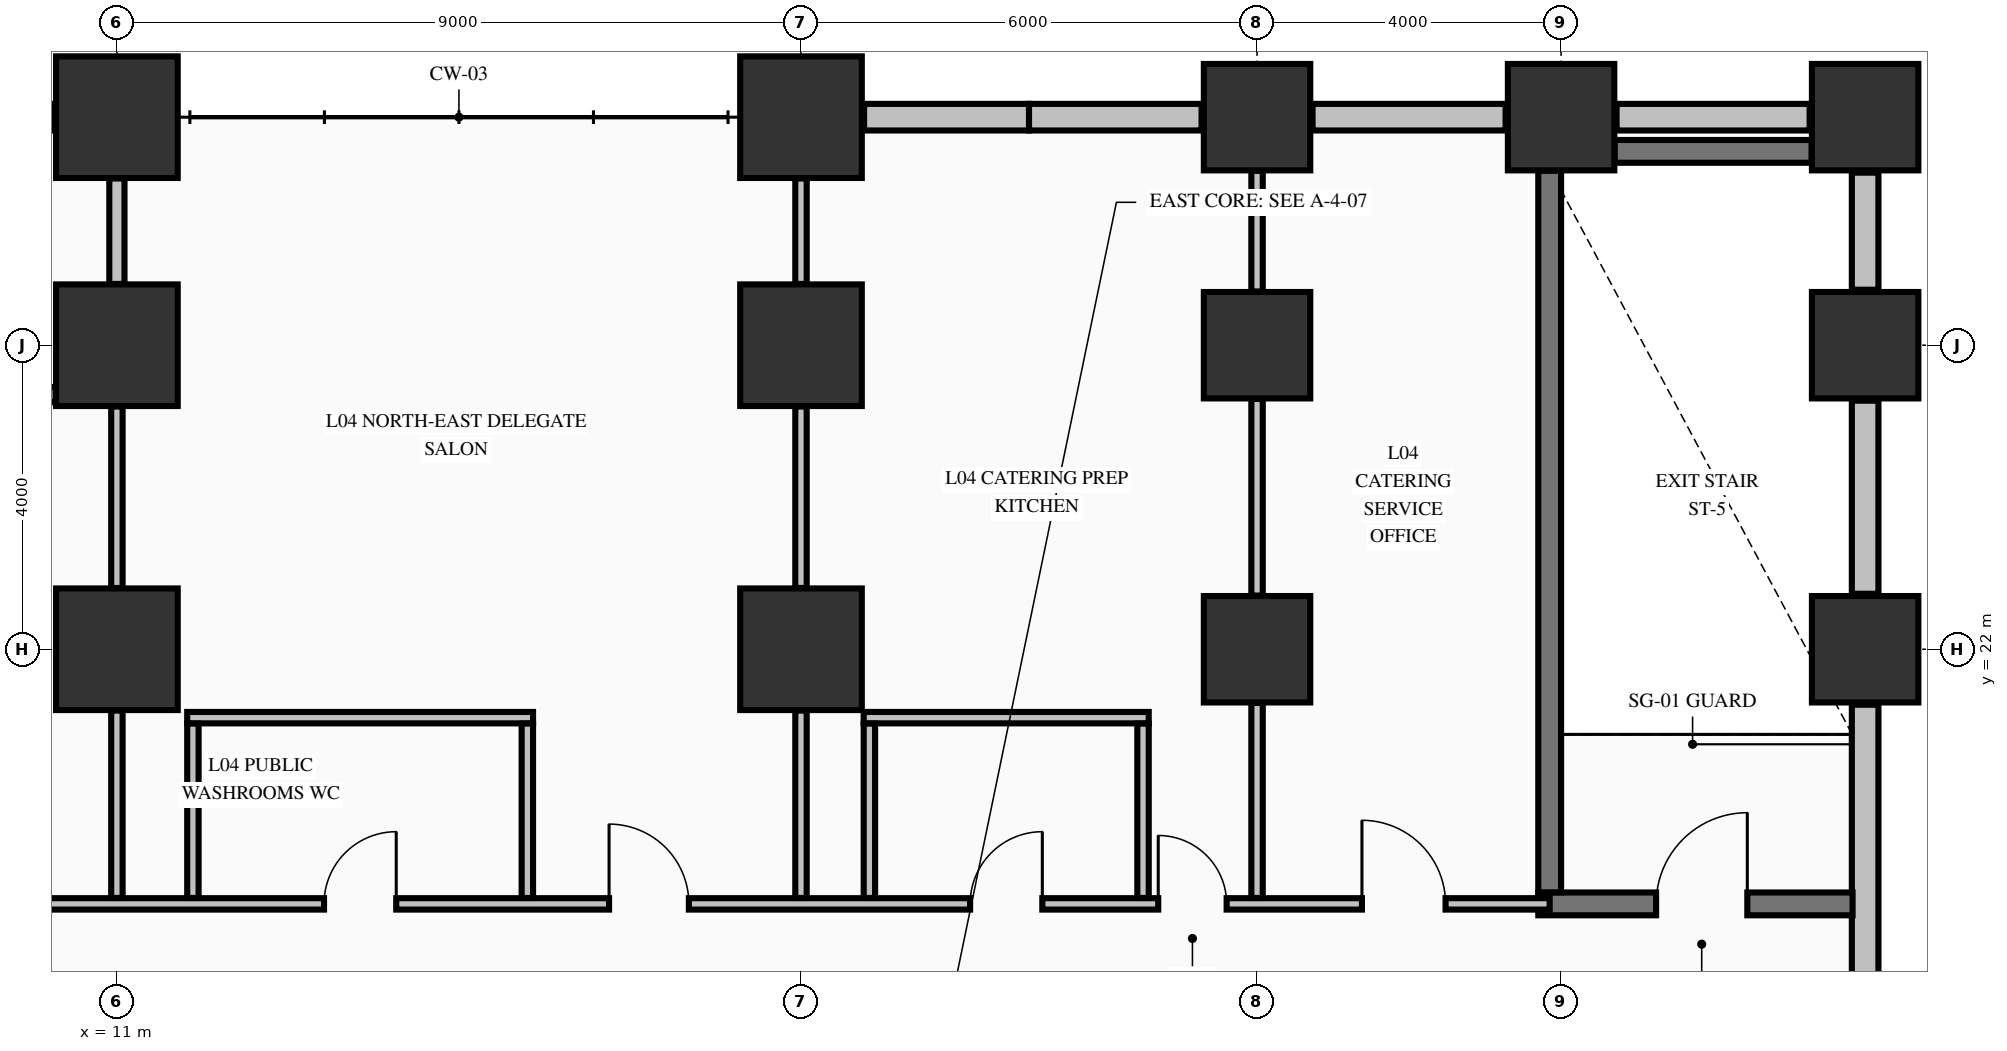
"""IFC4 building model, lengths in metres.
Left out: names, types, materials, properties, quantities, classifications, styles, units other than length and angle.
Written with IfcOpenShell. Run it as: python <this file> out.ifc"""

import sys

from ifc_helpers import new_model, si_unit, direction, frame, frame_2d, origin, origin_2d, place, context, subcontext, project, spatial, rectangle, extrude, element, fill, save


model = new_model("IFC4")
c1 = context("Model", 3, precision=1e-05, world=origin(), true_north=direction((0.0, 1.0)))
c2 = subcontext(c1, "Body", "Model", "MODEL_VIEW")
j1 = project(units=[si_unit("LENGTHUNIT", "METRE"), si_unit("PLANEANGLEUNIT", "RADIAN")], contexts=[c1])
p1 = place(None, origin())
s1 = spatial("IfcSite", under=j1, at=p1, CompositionType="ELEMENT")
p2 = place(p1, origin())
s2 = spatial("IfcBuilding", under=s1, at=p2, CompositionType="ELEMENT")
p3 = place(p2, frame((0.0, 0.0, 21.76)))
s3 = spatial("IfcBuildingStorey", under=s2, at=p3, CompositionType="ELEMENT", Elevation=21.76)
for number, where, z_axis, x_axis in (
    (1, (11.0, 22.0, -0.45), (0.0, 0.0, 1.0), (1.0, 0.0, 0.0)),
    (2, (11.0, 26.0, -0.45), (0.0, 0.0, 1.0), (1.0, 0.0, 0.0)),
    (3, (11.0, 29.0, -0.45), (0.0, 0.0, 1.0), (1.0, 0.0, 0.0)),
    (4, (20.0, 22.0, -0.45), (0.0, 0.0, 1.0), (1.0, 0.0, 0.0)),
    (5, (20.0, 26.0, -0.45), (0.0, 0.0, 1.0), (1.0, 0.0, 0.0)),
    (6, (20.0, 29.0, -0.45), (0.0, 0.0, 1.0), (1.0, 0.0, 0.0)),
):
    element("IfcColumn", number, at=place(p3, frame(where, z_axis=z_axis, x_axis=x_axis)), inside=s3, PredefinedType="COLUMN", context=c2, shape_type="SweptSolid", body=[
        extrude(rectangle(XDim=1.6, YDim=1.6, at=origin_2d()), origin(), (0.0, 0.0, 1.0), 5.44),
    ])
for number, where, z_axis, x_axis in (
    (7, (26.0, 22.0, -0.45), (0.0, 0.0, 1.0), (1.0, 0.0, 0.0)),
    (8, (26.0, 26.0, -0.45), (0.0, 0.0, 1.0), (1.0, 0.0, 0.0)),
    (9, (26.0, 29.0, -0.45), (0.0, 0.0, 1.0), (1.0, 0.0, 0.0)),
    (10, (30.0, 29.0, -0.45), (0.0, 0.0, 1.0), (1.0, 0.0, 0.0)),
    (11, (34.0, 22.0, -0.45), (0.0, 0.0, 1.0), (1.0, 0.0, 0.0)),
    (12, (34.0, 26.0, -0.45), (0.0, 0.0, 1.0), (1.0, 0.0, 0.0)),
    (13, (34.0, 29.0, -0.45), (0.0, 0.0, 1.0), (1.0, 0.0, 0.0)),
):
    element("IfcColumn", number, at=place(p3, frame(where, z_axis=z_axis, x_axis=x_axis)), inside=s3, PredefinedType="COLUMN", context=c2, shape_type="SweptSolid", body=[
        extrude(rectangle(XDim=1.4, YDim=1.4, at=origin_2d()), origin(), (0.0, 0.0, 1.0), 5.44),
    ])
p4 = place(p3, frame((10.17, 29.0, 0.0), z_axis=(0.0, 0.0, 1.0), x_axis=(-1.0, 0.0, 0.0)))
e14 = element("IfcWall", 14, at=p4, inside=s3, PredefinedType="STANDARD", context=c2, shape_type="SweptSolid", body=[
    extrude(rectangle(XDim=20.34, YDim=0.35, at=frame_2d((10.17, 0.0))), origin(), (0.0, 0.0, 1.0), 2.582),
])
p5 = place(p3, frame((23.0, 29.0, 0.0), z_axis=(0.0, 0.0, 1.0), x_axis=(-1.0, 0.0, 0.0)))
e15 = element("IfcWall", 15, at=p5, inside=s3, PredefinedType="STANDARD", context=c2, shape_type="SweptSolid", body=[
    extrude(rectangle(XDim=2.17, YDim=0.35, at=frame_2d((1.085, 0.0))), origin(), (0.0, 0.0, 1.0), 3.332),
])
p6 = place(p3, frame((25.27, 29.0, 0.0), z_axis=(0.0, 0.0, 1.0), x_axis=(-1.0, 0.0, 0.0)))
e16 = element("IfcWall", 16, at=p6, inside=s3, PredefinedType="STANDARD", context=c2, shape_type="SweptSolid", body=[
    extrude(rectangle(XDim=2.27, YDim=0.35, at=frame_2d((1.135, 0.0))), origin(), (0.0, 0.0, 1.0), 3.332),
])
for number, where, z_axis, x_axis in (
    (17, (29.27, 29.0, 0.0), (0.0, 0.0, 1.0), (-1.0, 0.0, 0.0)),
    (18, (33.27, 29.0, 0.0), (0.0, 0.0, 1.0), (-1.0, 0.0, 0.0)),
):
    element("IfcWall", number, at=place(p3, frame(where, z_axis=z_axis, x_axis=x_axis)), inside=s3, PredefinedType="STANDARD", context=c2, shape_type="SweptSolid", body=[
        extrude(rectangle(XDim=2.54, YDim=0.35, at=frame_2d((1.27, 0.0))), origin(), (0.0, 0.0, 1.0), 3.332),
    ])
p7 = place(p3, frame((34.0, 21.27, 0.0), z_axis=(0.0, 0.0, 1.0), x_axis=(0.0, -1.0, 0.0)))
e19 = element("IfcWall", 19, at=p7, inside=s3, PredefinedType="STANDARD", context=c2, shape_type="SweptSolid", body=[
    extrude(rectangle(XDim=4.54, YDim=0.35, at=frame_2d((2.27, 0.0))), origin(), (0.0, 0.0, 1.0), 4.99),
])
p8 = place(p3, frame((34.0, 25.27, 0.0), z_axis=(0.0, 0.0, 1.0), x_axis=(0.0, -1.0, 0.0)))
e20 = element("IfcWall", 20, at=p8, inside=s3, PredefinedType="STANDARD", context=c2, shape_type="SweptSolid", body=[
    extrude(rectangle(XDim=2.54, YDim=0.35, at=frame_2d((1.27, 0.0))), origin(), (0.0, 0.0, 1.0), 4.99),
])
p9 = place(p3, frame((34.0, 28.27, 0.0), z_axis=(0.0, 0.0, 1.0), x_axis=(0.0, -1.0, 0.0)))
e21 = element("IfcWall", 21, at=p9, inside=s3, PredefinedType="STANDARD", context=c2, shape_type="SweptSolid", body=[
    extrude(rectangle(XDim=1.54, YDim=0.35, at=frame_2d((0.77, 0.0))), origin(), (0.0, 0.0, 1.0), 4.99),
])
p10 = place(p3, frame((29.7, 18.65, 0.0), z_axis=(0.0, 0.0, 1.0), x_axis=(1.0, 0.0, 0.0)))
e22 = element("IfcWall", 22, at=p10, inside=s3, PredefinedType="SHEAR", context=c2, shape_type="SweptSolid", body=[
    extrude(rectangle(XDim=4.135, YDim=0.3, at=frame_2d((2.067, 0.0))), origin(), (0.0, 0.0, 1.0), 4.99),
])
p11 = place(p10, frame((1.55, 0.0, 0.0)))
e23 = element("IfcOpeningElement", 23, at=p11, cuts=e22, PredefinedType="OPENING", context=c2, shape_type="SweptSolid", body=[
    extrude(rectangle(XDim=1.2, YDim=2.15, at=frame_2d((0.6, 1.075))), frame((0.0, 0.16, 0.0), z_axis=(0.0, -1.0, 0.0), x_axis=(1.0, 0.0, 0.0)), (0.0, 0.0, 1.0), 0.32),
])
p12 = place(p3, frame((30.704, 28.55, 0.0), z_axis=(0.0, 0.0, 1.0), x_axis=(1.0, 0.0, 0.0)))
e24 = element("IfcWall", 24, at=p12, inside=s3, PredefinedType="SHEAR", context=c2, shape_type="SweptSolid", body=[
    extrude(rectangle(XDim=2.592, YDim=0.3, at=frame_2d((1.296, 0.0))), origin(), (0.0, 0.0, 1.0), 4.99),
])
p13 = place(p3, frame((-33.835, 18.65, 0.0), z_axis=(0.0, 0.0, 1.0), x_axis=(1.0, 0.0, 0.0)))
e25 = element("IfcWall", 25, at=p13, inside=s3, PredefinedType="PARTITIONING", context=c2, shape_type="SweptSolid", body=[
    extrude(rectangle(XDim=63.685, YDim=0.15, at=frame_2d((31.843, 0.0))), origin(), (0.0, 0.0, 1.0), 4.99),
])
p14 = place(p13, frame((27.81, 0.0, 0.0)))
e26 = element("IfcOpeningElement", 26, at=p14, cuts=e25, PredefinedType="OPENING", context=c2, shape_type="SweptSolid", body=[
    extrude(rectangle(XDim=1.05, YDim=2.15, at=frame_2d((0.525, 1.075))), frame((0.0, 0.085, 0.0), z_axis=(0.0, -1.0, 0.0), x_axis=(1.0, 0.0, 0.0)), (0.0, 0.0, 1.0), 0.17),
])
p15 = place(p13, frame((24.46, 0.0, 0.0)))
e27 = element("IfcOpeningElement", 27, at=p15, cuts=e25, PredefinedType="OPENING", context=c2, shape_type="SweptSolid", body=[
    extrude(rectangle(XDim=1.05, YDim=2.15, at=frame_2d((0.525, 1.075))), frame((0.0, 0.085, 0.0), z_axis=(0.0, -1.0, 0.0), x_axis=(1.0, 0.0, 0.0)), (0.0, 0.0, 1.0), 0.17),
])
p16 = place(p13, frame((31.16, 0.0, 0.0)))
e28 = element("IfcOpeningElement", 28, at=p16, cuts=e25, PredefinedType="OPENING", context=c2, shape_type="SweptSolid", body=[
    extrude(rectangle(XDim=1.05, YDim=2.15, at=frame_2d((0.525, 1.075))), frame((0.0, 0.085, 0.0), z_axis=(0.0, -1.0, 0.0), x_axis=(1.0, 0.0, 0.0)), (0.0, 0.0, 1.0), 0.17),
])
p17 = place(p13, frame((38.785, 0.0, 0.0)))
e29 = element("IfcOpeningElement", 29, at=p17, cuts=e25, PredefinedType="OPENING", context=c2, shape_type="SweptSolid", body=[
    extrude(rectangle(XDim=1.1, YDim=2.15, at=frame_2d((0.55, 1.075))), frame((0.0, 0.085, 0.0), z_axis=(0.0, -1.0, 0.0), x_axis=(1.0, 0.0, 0.0)), (0.0, 0.0, 1.0), 0.17),
])
p18 = place(p13, frame((1.285, 0.0, 0.0)))
e30 = element("IfcOpeningElement", 30, at=p18, cuts=e25, PredefinedType="OPENING", context=c2, shape_type="SweptSolid", body=[
    extrude(rectangle(XDim=1.1, YDim=2.15, at=frame_2d((0.55, 1.075))), frame((0.0, 0.085, 0.0), z_axis=(0.0, -1.0, 0.0), x_axis=(1.0, 0.0, 0.0)), (0.0, 0.0, 1.0), 0.17),
])
p19 = place(p13, frame((5.36, 0.0, 0.0)))
e31 = element("IfcOpeningElement", 31, at=p19, cuts=e25, PredefinedType="OPENING", context=c2, shape_type="SweptSolid", body=[
    extrude(rectangle(XDim=0.95, YDim=2.15, at=frame_2d((0.475, 1.075))), frame((0.0, 0.085, 0.0), z_axis=(0.0, -1.0, 0.0), x_axis=(1.0, 0.0, 0.0)), (0.0, 0.0, 1.0), 0.17),
])
p20 = place(p13, frame((10.285, 0.0, 0.0)))
e32 = element("IfcOpeningElement", 32, at=p20, cuts=e25, PredefinedType="OPENING", context=c2, shape_type="SweptSolid", body=[
    extrude(rectangle(XDim=1.1, YDim=2.15, at=frame_2d((0.55, 1.075))), frame((0.0, 0.085, 0.0), z_axis=(0.0, -1.0, 0.0), x_axis=(1.0, 0.0, 0.0)), (0.0, 0.0, 1.0), 0.17),
])
p21 = place(p13, frame((17.785, 0.0, 0.0)))
e33 = element("IfcOpeningElement", 33, at=p21, cuts=e25, PredefinedType="OPENING", context=c2, shape_type="SweptSolid", body=[
    extrude(rectangle(XDim=1.1, YDim=2.15, at=frame_2d((0.55, 1.075))), frame((0.0, 0.085, 0.0), z_axis=(0.0, -1.0, 0.0), x_axis=(1.0, 0.0, 0.0)), (0.0, 0.0, 1.0), 0.17),
])
p22 = place(p13, frame((61.215, 0.0, 0.0)))
e34 = element("IfcOpeningElement", 34, at=p22, cuts=e25, PredefinedType="OPENING", context=c2, shape_type="SweptSolid", body=[
    extrude(rectangle(XDim=1.1, YDim=2.15, at=frame_2d((0.55, 1.075))), frame((0.0, 0.085, 0.0), z_axis=(0.0, -1.0, 0.0), x_axis=(1.0, 0.0, 0.0)), (0.0, 0.0, 1.0), 0.17),
])
p23 = place(p13, frame((47.56, 0.0, 0.0)))
e35 = element("IfcOpeningElement", 35, at=p23, cuts=e25, PredefinedType="OPENING", context=c2, shape_type="SweptSolid", body=[
    extrude(rectangle(XDim=0.95, YDim=2.15, at=frame_2d((0.475, 1.075))), frame((0.0, 0.085, 0.0), z_axis=(0.0, -1.0, 0.0), x_axis=(1.0, 0.0, 0.0)), (0.0, 0.0, 1.0), 0.17),
])
p24 = place(p13, frame((51.31, 0.0, 0.0)))
e36 = element("IfcOpeningElement", 36, at=p24, cuts=e25, PredefinedType="OPENING", context=c2, shape_type="SweptSolid", body=[
    extrude(rectangle(XDim=1.05, YDim=2.15, at=frame_2d((0.525, 1.075))), frame((0.0, 0.085, 0.0), z_axis=(0.0, -1.0, 0.0), x_axis=(1.0, 0.0, 0.0)), (0.0, 0.0, 1.0), 0.17),
])
p25 = place(p13, frame((56.06, 0.0, 0.0)))
e37 = element("IfcOpeningElement", 37, at=p25, cuts=e25, PredefinedType="OPENING", context=c2, shape_type="SweptSolid", body=[
    extrude(rectangle(XDim=0.95, YDim=2.15, at=frame_2d((0.475, 1.075))), frame((0.0, 0.085, 0.0), z_axis=(0.0, -1.0, 0.0), x_axis=(1.0, 0.0, 0.0)), (0.0, 0.0, 1.0), 0.17),
])
p26 = place(p13, frame((58.535, 0.0, 0.0)))
e38 = element("IfcOpeningElement", 38, at=p26, cuts=e25, PredefinedType="OPENING", context=c2, shape_type="SweptSolid", body=[
    extrude(rectangle(XDim=0.9, YDim=2.15, at=frame_2d((0.45, 1.075))), frame((0.0, 0.085, 0.0), z_axis=(0.0, -1.0, 0.0), x_axis=(1.0, 0.0, 0.0)), (0.0, 0.0, 1.0), 0.17),
])
p27 = place(p3, frame((11.925, 21.1, 0.0), z_axis=(0.0, 0.0, 1.0), x_axis=(1.0, 0.0, 0.0)))
e39 = element("IfcWall", 39, at=p27, inside=s3, PredefinedType="PARTITIONING", context=c2, shape_type="SweptSolid", body=[
    extrude(rectangle(XDim=4.55, YDim=0.15, at=frame_2d((2.275, 0.0))), origin(), (0.0, 0.0, 1.0), 3.332),
])
p28 = place(p3, frame((20.825, 21.1, 0.0), z_axis=(0.0, 0.0, 1.0), x_axis=(1.0, 0.0, 0.0)))
e40 = element("IfcWall", 40, at=p28, inside=s3, PredefinedType="PARTITIONING", context=c2, shape_type="SweptSolid", body=[
    extrude(rectangle(XDim=3.75, YDim=0.15, at=frame_2d((1.875, 0.0))), origin(), (0.0, 0.0, 1.0), 3.332),
])
p29 = place(p3, frame((0.706, 25.35, 0.0), z_axis=(0.0, 0.0, 1.0), x_axis=(1.0, 0.0, 0.0)))
e41 = element("IfcWall", 41, at=p29, inside=s3, PredefinedType="PARTITIONING", context=c2, shape_type="SweptSolid", body=[
    extrude(rectangle(XDim=9.488, YDim=0.2, at=frame_2d((4.744, 0.0))), origin(), (0.0, 0.0, 1.0), 3.332),
])
p30 = place(p3, frame((29.85, 18.802, 0.0), z_axis=(0.0, 0.0, 1.0), x_axis=(0.0, 1.0, 0.0)))
e42 = element("IfcWall", 42, at=p30, inside=s3, PredefinedType="SHEAR", context=c2, shape_type="SweptSolid", body=[
    extrude(rectangle(XDim=9.494, YDim=0.3, at=frame_2d((4.747, 0.0))), origin(), (0.0, 0.0, 1.0), 4.99),
])
p31 = place(p3, frame((11.0, 18.728, 0.0), z_axis=(0.0, 0.0, 1.0), x_axis=(0.0, 1.0, 0.0)))
e43 = element("IfcWall", 43, at=p31, inside=s3, PredefinedType="PARTITIONING", context=c2, shape_type="SweptSolid", body=[
    extrude(rectangle(XDim=2.466, YDim=0.15, at=frame_2d((1.233, 0.0))), origin(), (0.0, 0.0, 1.0), 3.332),
])
p32 = place(p3, frame((11.0, 22.806, 0.0), z_axis=(0.0, 0.0, 1.0), x_axis=(0.0, 1.0, 0.0)))
e44 = element("IfcWall", 44, at=p32, inside=s3, PredefinedType="PARTITIONING", context=c2, shape_type="SweptSolid", body=[
    extrude(rectangle(XDim=2.388, YDim=0.15, at=frame_2d((1.194, 0.0))), origin(), (0.0, 0.0, 1.0), 3.332),
])
p33 = place(p3, frame((11.0, 26.806, 0.0), z_axis=(0.0, 0.0, 1.0), x_axis=(0.0, 1.0, 0.0)))
e45 = element("IfcWall", 45, at=p33, inside=s3, PredefinedType="PARTITIONING", context=c2, shape_type="SweptSolid", body=[
    extrude(rectangle(XDim=1.388, YDim=0.2, at=frame_2d((0.694, 0.0))), origin(), (0.0, 0.0, 1.0), 3.332),
])
for number, where, z_axis, x_axis in (
    (46, (12.0, 18.728, 0.0), (0.0, 0.0, 1.0), (0.0, 1.0, 0.0)),
    (47, (16.4, 18.728, 0.0), (0.0, 0.0, 1.0), (0.0, 1.0, 0.0)),
):
    element("IfcWall", number, at=place(p3, frame(where, z_axis=z_axis, x_axis=x_axis)), inside=s3, PredefinedType="PARTITIONING", context=c2, shape_type="SweptSolid", body=[
        extrude(rectangle(XDim=2.294, YDim=0.15, at=frame_2d((1.147, 0.0))), origin(), (0.0, 0.0, 1.0), 4.99),
    ])
p34 = place(p3, frame((20.0, 18.728, 0.0), z_axis=(0.0, 0.0, 1.0), x_axis=(0.0, 1.0, 0.0)))
e48 = element("IfcWall", 48, at=p34, inside=s3, PredefinedType="PARTITIONING", context=c2, shape_type="SweptSolid", body=[
    extrude(rectangle(XDim=2.466, YDim=0.15, at=frame_2d((1.233, 0.0))), origin(), (0.0, 0.0, 1.0), 3.332),
])
p35 = place(p3, frame((20.0, 22.806, 0.0), z_axis=(0.0, 0.0, 1.0), x_axis=(0.0, 1.0, 0.0)))
e49 = element("IfcWall", 49, at=p35, inside=s3, PredefinedType="PARTITIONING", context=c2, shape_type="SweptSolid", body=[
    extrude(rectangle(XDim=2.388, YDim=0.15, at=frame_2d((1.194, 0.0))), origin(), (0.0, 0.0, 1.0), 3.332),
])
p36 = place(p3, frame((20.0, 26.806, 0.0), z_axis=(0.0, 0.0, 1.0), x_axis=(0.0, 1.0, 0.0)))
e50 = element("IfcWall", 50, at=p36, inside=s3, PredefinedType="PARTITIONING", context=c2, shape_type="SweptSolid", body=[
    extrude(rectangle(XDim=1.388, YDim=0.15, at=frame_2d((0.694, 0.0))), origin(), (0.0, 0.0, 1.0), 3.332),
])
p37 = place(p3, frame((20.9, 18.728, 0.0), z_axis=(0.0, 0.0, 1.0), x_axis=(0.0, 1.0, 0.0)))
e51 = element("IfcWall", 51, at=p37, inside=s3, PredefinedType="PARTITIONING", context=c2, shape_type="SweptSolid", body=[
    extrude(rectangle(XDim=2.294, YDim=0.15, at=frame_2d((1.147, 0.0))), origin(), (0.0, 0.0, 1.0), 4.99),
])
p38 = place(p3, frame((24.5, 18.728, 0.0), z_axis=(0.0, 0.0, 1.0), x_axis=(0.0, 1.0, 0.0)))
e52 = element("IfcWall", 52, at=p38, inside=s3, PredefinedType="PARTITIONING", context=c2, shape_type="SweptSolid", body=[
    extrude(rectangle(XDim=2.294, YDim=0.15, at=frame_2d((1.147, 0.0))), origin(), (0.0, 0.0, 1.0), 3.332),
])
p39 = place(p3, frame((26.0, 18.728, 0.0), z_axis=(0.0, 0.0, 1.0), x_axis=(0.0, 1.0, 0.0)))
e53 = element("IfcWall", 53, at=p39, inside=s3, PredefinedType="PARTITIONING", context=c2, shape_type="SweptSolid", body=[
    extrude(rectangle(XDim=2.566, YDim=0.15, at=frame_2d((1.283, 0.0))), origin(), (0.0, 0.0, 1.0), 3.332),
])
p40 = place(p3, frame((26.0, 22.706, 0.0), z_axis=(0.0, 0.0, 1.0), x_axis=(0.0, 1.0, 0.0)))
e54 = element("IfcWall", 54, at=p40, inside=s3, PredefinedType="PARTITIONING", context=c2, shape_type="SweptSolid", body=[
    extrude(rectangle(XDim=2.588, YDim=0.15, at=frame_2d((1.294, 0.0))), origin(), (0.0, 0.0, 1.0), 3.332),
])
p41 = place(p3, frame((26.0, 26.706, 0.0), z_axis=(0.0, 0.0, 1.0), x_axis=(0.0, 1.0, 0.0)))
e55 = element("IfcWall", 55, at=p41, inside=s3, PredefinedType="PARTITIONING", context=c2, shape_type="SweptSolid", body=[
    extrude(rectangle(XDim=1.588, YDim=0.15, at=frame_2d((0.794, 0.0))), origin(), (0.0, 0.0, 1.0), 3.332),
])
p42 = place(p11, origin())
e56 = element("IfcDoor", 56, at=p42, inside=s3, OperationType="SINGLE_SWING_RIGHT", PredefinedType="DOOR", context=c2, shape_type="SweptSolid", body=[
    extrude(rectangle(XDim=1.2, YDim=2.15, at=frame_2d((0.6, 1.075))), frame((0.0, 0.025, 0.0), z_axis=(0.0, -1.0, 0.0), x_axis=(1.0, 0.0, 0.0)), (0.0, 0.0, 1.0), 0.05),
])
fill(e23, e56)
p43 = place(p22, origin())
e57 = element("IfcDoor", 57, at=p43, inside=s3, OperationType="SINGLE_SWING_LEFT", PredefinedType="DOOR", context=c2, shape_type="SweptSolid", body=[
    extrude(rectangle(XDim=1.1, YDim=2.15, at=frame_2d((0.55, 1.075))), frame((0.0, 0.025, 0.0), z_axis=(0.0, -1.0, 0.0), x_axis=(1.0, 0.0, 0.0)), (0.0, 0.0, 1.0), 0.05),
])
fill(e34, e57)
p44 = place(p23, origin())
e58 = element("IfcDoor", 58, at=p44, inside=s3, OperationType="SINGLE_SWING_RIGHT", PredefinedType="DOOR", context=c2, shape_type="SweptSolid", body=[
    extrude(rectangle(XDim=0.95, YDim=2.15, at=frame_2d((0.475, 1.075))), frame((0.0, 0.025, 0.0), z_axis=(0.0, -1.0, 0.0), x_axis=(1.0, 0.0, 0.0)), (0.0, 0.0, 1.0), 0.05),
])
fill(e35, e58)
p45 = place(p24, origin())
e59 = element("IfcDoor", 59, at=p45, inside=s3, OperationType="SINGLE_SWING_LEFT", PredefinedType="DOOR", context=c2, shape_type="SweptSolid", body=[
    extrude(rectangle(XDim=1.05, YDim=2.15, at=frame_2d((0.525, 1.075))), frame((0.0, 0.025, 0.0), z_axis=(0.0, -1.0, 0.0), x_axis=(1.0, 0.0, 0.0)), (0.0, 0.0, 1.0), 0.05),
])
fill(e36, e59)
p46 = place(p25, origin())
e60 = element("IfcDoor", 60, at=p46, inside=s3, OperationType="SINGLE_SWING_RIGHT", PredefinedType="DOOR", context=c2, shape_type="SweptSolid", body=[
    extrude(rectangle(XDim=0.95, YDim=2.15, at=frame_2d((0.475, 1.075))), frame((0.0, 0.025, 0.0), z_axis=(0.0, -1.0, 0.0), x_axis=(1.0, 0.0, 0.0)), (0.0, 0.0, 1.0), 0.05),
])
fill(e37, e60)
p47 = place(p26, origin())
e61 = element("IfcDoor", 61, at=p47, inside=s3, OperationType="SINGLE_SWING_LEFT", PredefinedType="DOOR", context=c2, shape_type="SweptSolid", body=[
    extrude(rectangle(XDim=0.9, YDim=2.15, at=frame_2d((0.45, 1.075))), frame((0.0, 0.025, 0.0), z_axis=(0.0, -1.0, 0.0), x_axis=(1.0, 0.0, 0.0)), (0.0, 0.0, 1.0), 0.05),
])
fill(e38, e61)
save(model, sys.argv[1])
